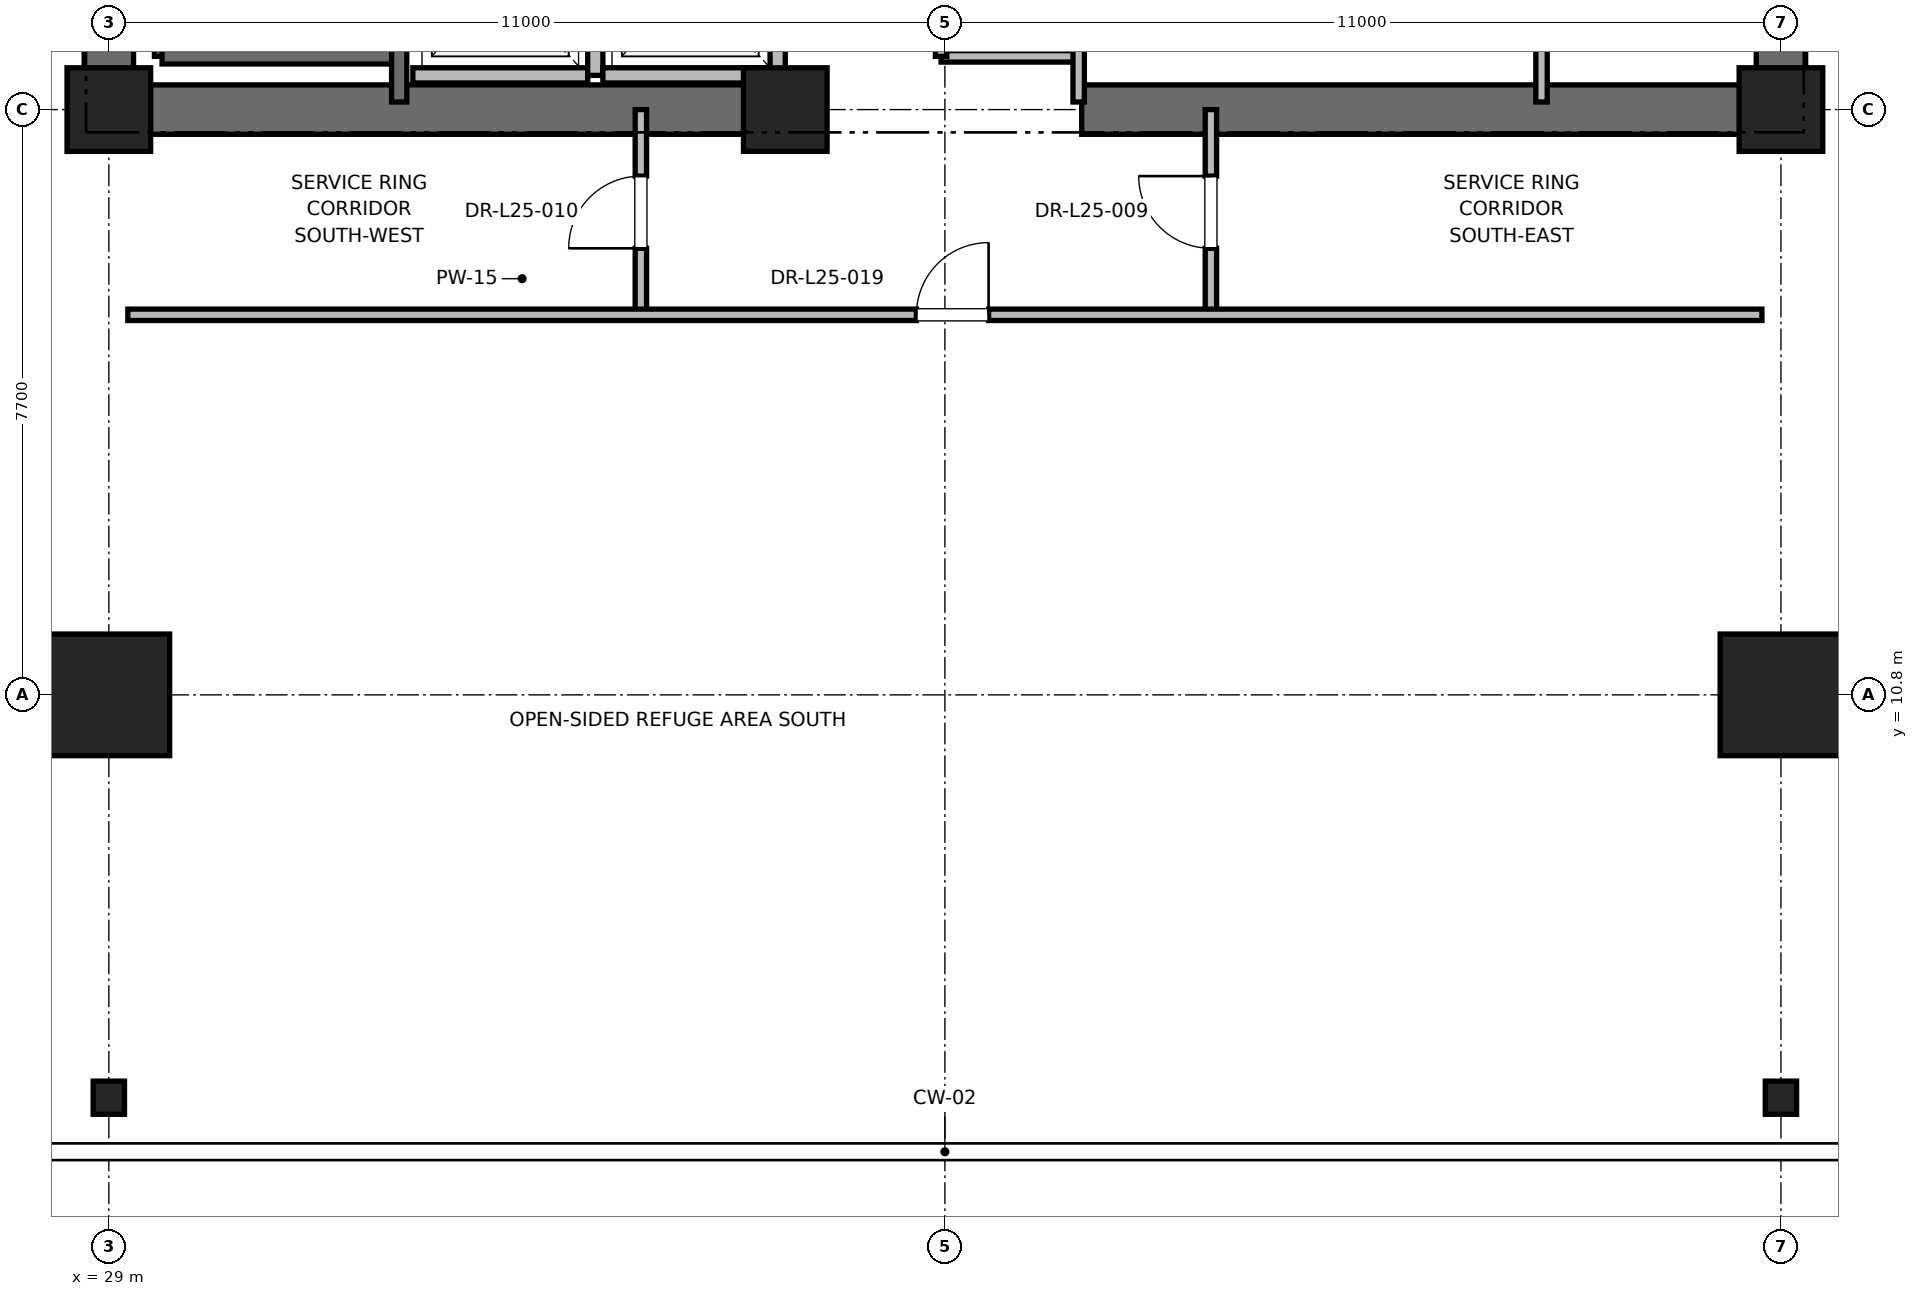
"""IFC4 building model, lengths in metres.
Left out: names, types, materials, properties, quantities, classifications, styles, units other than length and angle.
Written with IfcOpenShell. Run it as: python <this file> out.ifc"""

import sys

from ifc_helpers import new_model, si_unit, direction, frame, frame_2d, origin, origin_2d, place, context, subcontext, project, spatial, rectangle, i_section, extrude, element, fill, save


model = new_model("IFC4")
c1 = context("Model", 3, precision=1e-05, world=origin(), true_north=direction((0.0, 1.0)))
c2 = subcontext(c1, "Body", "Model", "MODEL_VIEW")
j1 = project(units=[si_unit("LENGTHUNIT", "METRE"), si_unit("PLANEANGLEUNIT", "RADIAN")], contexts=[c1])
p1 = place(None, origin())
s1 = spatial("IfcSite", under=j1, at=p1, CompositionType="ELEMENT")
p2 = place(p1, origin())
s2 = spatial("IfcBuilding", under=s1, at=p2, CompositionType="ELEMENT")
p3 = place(p2, frame((0.0, 0.0, 107.6)))
s3 = spatial("IfcBuildingStorey", under=s2, at=p3, CompositionType="ELEMENT", Elevation=107.6)
for number, where, z_axis, x_axis in (
    (1, (29.0, 10.8, 0.0), (0.0, 0.0, 1.0), (1.0, 0.0, 0.0)),
    (2, (51.0, 10.8, 0.0), (0.0, 0.0, 1.0), (1.0, 0.0, 0.0)),
):
    element("IfcColumn", number, at=place(p3, frame(where, z_axis=z_axis, x_axis=x_axis)), inside=s3, PredefinedType="COLUMN", context=c2, shape_type="SweptSolid", body=[
        extrude(rectangle(XDim=1.6, YDim=1.6, at=origin_2d()), origin(), (0.0, 0.0, 1.0), 5.4),
    ])
for number, where, z_axis, x_axis in (
    (3, (29.0, 5.5, 0.0), (0.0, 0.0, 1.0), (1.0, 0.0, 0.0)),
    (4, (51.0, 5.5, 0.0), (0.0, 0.0, 1.0), (1.0, 0.0, 0.0)),
):
    element("IfcColumn", number, at=place(p3, frame(where, z_axis=z_axis, x_axis=x_axis)), inside=s3, PredefinedType="COLUMN", context=c2, shape_type="SweptSolid", body=[
        extrude(i_section(OverallWidth=0.412, OverallDepth=0.437, WebThickness=0.036, FlangeThickness=0.058, FilletRadius=0.015, at=origin_2d()), origin(), (0.0, 0.0, 1.0), 5.4),
    ])
for number, where, z_axis, x_axis in (
    (5, (29.0, 18.5, 0.0), (0.0, 0.0, 1.0), (1.0, 0.0, 0.0)),
    (6, (51.0, 18.5, 0.0), (0.0, 0.0, 1.0), (1.0, 0.0, 0.0)),
    (7, (37.9, 18.5, 0.0), (0.0, 0.0, 1.0), (1.0, 0.0, 0.0)),
):
    element("IfcColumn", number, at=place(p3, frame(where, z_axis=z_axis, x_axis=x_axis)), inside=s3, PredefinedType="PILASTER", context=c2, shape_type="SweptSolid", body=[
        extrude(rectangle(XDim=1.1, YDim=1.1, at=origin_2d()), origin(), (0.0, 0.0, 1.0), 5.4),
    ])
for number, where, z_axis, x_axis in (
    (8, (29.0, 18.5, 0.0), (0.0, 0.0, 1.0), (1.0, 0.0, 0.0)),
    (9, (41.8, 18.5, 0.0), (0.0, 0.0, 1.0), (1.0, 0.0, 0.0)),
):
    element("IfcWall", number, at=place(p3, frame(where, z_axis=z_axis, x_axis=x_axis)), inside=s3, PredefinedType="SHEAR", context=c2, shape_type="SweptSolid", body=[
        extrude(rectangle(XDim=9.2, YDim=0.65, at=frame_2d((4.6, 0.0))), origin(), (0.0, 0.0, 1.0), 5.1),
    ])
p4 = place(p3, frame((29.0, 18.5, 0.0), z_axis=(0.0, 0.0, 1.0), x_axis=(0.0, 1.0, 0.0)))
e10 = element("IfcWall", 10, at=p4, inside=s3, PredefinedType="SHEAR", context=c2, shape_type="SweptSolid", body=[
    extrude(rectangle(XDim=8.8, YDim=0.65, at=frame_2d((4.4, 0.0))), origin(), (0.0, 0.0, 1.0), 5.1),
])
p5 = place(p3, frame((51.0, 18.5, 0.0), z_axis=(0.0, 0.0, 1.0), x_axis=(0.0, 1.0, 0.0)))
e11 = element("IfcWall", 11, at=p5, inside=s3, PredefinedType="SHEAR", context=c2, shape_type="SweptSolid", body=[
    extrude(rectangle(XDim=5.8, YDim=0.65, at=frame_2d((2.9, 0.0))), origin(), (0.0, 0.0, 1.0), 5.1),
])
p6 = place(p3, frame((29.7, 19.2, 0.0), z_axis=(0.0, 0.0, 1.0), x_axis=(0.0, 1.0, 0.0)))
e12 = element("IfcWall", 12, at=p6, inside=s3, PredefinedType="SOLIDWALL", context=c2, shape_type="SweptSolid", body=[
    extrude(rectangle(XDim=8.15, YDim=0.2, at=frame_2d((4.075, 0.0))), origin(), (0.0, 0.0, 1.0), 5.1),
])
p7 = place(p3, frame((29.7, 19.2, 0.0), z_axis=(0.0, 0.0, 1.0), x_axis=(1.0, 0.0, 0.0)))
e13 = element("IfcWall", 13, at=p7, inside=s3, PredefinedType="SOLIDWALL", context=c2, shape_type="SweptSolid", body=[
    extrude(rectangle(XDim=3.12, YDim=0.2, at=frame_2d((1.56, 0.0))), origin(), (0.0, 0.0, 1.0), 5.1),
])
p8 = place(p3, frame((32.82, 18.6, 0.0), z_axis=(0.0, 0.0, 1.0), x_axis=(0.0, 1.0, 0.0)))
e14 = element("IfcWall", 14, at=p8, inside=s3, PredefinedType="SOLIDWALL", context=c2, shape_type="SweptSolid", body=[
    extrude(rectangle(XDim=8.78, YDim=0.2, at=frame_2d((4.39, 0.0))), origin(), (0.0, 0.0, 1.0), 5.1),
])
p9 = place(p3, frame((33.0, 18.95, 0.0), z_axis=(0.0, 0.0, 1.0), x_axis=(1.0, 0.0, 0.0)))
e15 = element("IfcWall", 15, at=p9, inside=s3, PredefinedType="SOLIDWALL", context=c2, shape_type="SweptSolid", body=[
    extrude(rectangle(XDim=2.3, YDim=0.2, at=frame_2d((1.15, 0.0))), origin(), (0.0, 0.0, 1.0), 5.1),
])
p10 = place(p3, frame((35.4, 18.95, 0.0), z_axis=(0.0, 0.0, 1.0), x_axis=(0.0, 1.0, 0.0)))
e16 = element("IfcWall", 16, at=p10, inside=s3, PredefinedType="SOLIDWALL", context=c2, shape_type="SweptSolid", body=[
    extrude(rectangle(XDim=2.6, YDim=0.2, at=frame_2d((1.3, 0.0))), origin(), (0.0, 0.0, 1.0), 5.1),
])
p11 = place(p3, frame((35.5, 18.95, 0.0), z_axis=(0.0, 0.0, 1.0), x_axis=(1.0, 0.0, 0.0)))
e17 = element("IfcWall", 17, at=p11, inside=s3, PredefinedType="SOLIDWALL", context=c2, shape_type="SweptSolid", body=[
    extrude(rectangle(XDim=2.3, YDim=0.2, at=frame_2d((1.15, 0.0))), origin(), (0.0, 0.0, 1.0), 3.88),
])
p12 = place(p3, frame((37.8, 18.95, 0.0), z_axis=(0.0, 0.0, 1.0), x_axis=(0.0, 1.0, 0.0)))
e18 = element("IfcWall", 18, at=p12, inside=s3, PredefinedType="SOLIDWALL", context=c2, shape_type="SweptSolid", body=[
    extrude(rectangle(XDim=2.6, YDim=0.2, at=frame_2d((1.3, 0.0))), origin(), (0.0, 0.0, 1.0), 3.88),
])
p13 = place(p3, frame((39.95, 19.2, 0.0), z_axis=(0.0, 0.0, 1.0), x_axis=(1.0, 0.0, 0.0)))
e19 = element("IfcWall", 19, at=p13, inside=s3, PredefinedType="PARTITIONING", context=c2, shape_type="SweptSolid", body=[
    extrude(rectangle(XDim=1.81, YDim=0.15, at=frame_2d((0.905, 0.0))), origin(), (0.0, 0.0, 1.0), 2.85),
])
p14 = place(p3, frame((41.76, 18.6, 0.0), z_axis=(0.0, 0.0, 1.0), x_axis=(0.0, 1.0, 0.0)))
e20 = element("IfcWall", 20, at=p14, inside=s3, PredefinedType="PARTITIONING", context=c2, shape_type="SweptSolid", body=[
    extrude(rectangle(XDim=3.6, YDim=0.15, at=frame_2d((1.8, 0.0))), origin(), (0.0, 0.0, 1.0), 2.85),
])
p15 = place(p3, frame((39.95, 19.2, 0.0), z_axis=(0.0, 0.0, 1.0), x_axis=(0.0, 1.0, 0.0)))
e21 = element("IfcWall", 21, at=p15, inside=s3, PredefinedType="PARTITIONING", context=c2, shape_type="SweptSolid", body=[
    extrude(rectangle(XDim=3.0, YDim=0.15, at=frame_2d((1.5, 0.0))), origin(), (0.0, 0.0, 1.0), 2.85),
])
p16 = place(p15, frame((1.05, 0.0, 0.0)))
e22 = element("IfcOpeningElement", 22, at=p16, cuts=e21, PredefinedType="OPENING", context=c2, shape_type="SweptSolid", body=[
    extrude(rectangle(XDim=0.9, YDim=2.1, at=frame_2d((0.45, 1.05))), frame((0.0, 0.075, 0.0), z_axis=(0.0, -1.0, 0.0), x_axis=(1.0, 0.0, 0.0)), (0.0, 0.0, 1.0), 0.15),
])
p17 = place(p3, frame((47.85, 18.6, 0.0), z_axis=(0.0, 0.0, 1.0), x_axis=(0.0, 1.0, 0.0)))
e23 = element("IfcWall", 23, at=p17, inside=s3, PredefinedType="PARTITIONING", context=c2, shape_type="SweptSolid", body=[
    extrude(rectangle(XDim=2.54, YDim=0.15, at=frame_2d((1.27, 0.0))), origin(), (0.0, 0.0, 1.0), 2.85),
])
p18 = place(p3, frame((36.0, 15.8, 0.0), z_axis=(0.0, 0.0, 1.0), x_axis=(0.0, 1.0, 0.0)))
e24 = element("IfcWall", 24, at=p18, inside=s3, PredefinedType="PARTITIONING", context=c2, shape_type="SweptSolid", body=[
    extrude(rectangle(XDim=2.7, YDim=0.15, at=frame_2d((1.35, 0.0))), origin(), (0.0, 0.0, 1.0), 2.85),
])
p19 = place(p18, frame((0.875, 0.0, 0.0)))
e25 = element("IfcOpeningElement", 25, at=p19, cuts=e24, PredefinedType="OPENING", context=c2, shape_type="SweptSolid", body=[
    extrude(rectangle(XDim=0.95, YDim=2.15, at=frame_2d((0.475, 1.075))), frame((0.0, 0.075, 0.0), z_axis=(0.0, -1.0, 0.0), x_axis=(1.0, 0.0, 0.0)), (0.0, 0.0, 1.0), 0.15),
])
p20 = place(p3, frame((43.5, 15.8, 0.0), z_axis=(0.0, 0.0, 1.0), x_axis=(0.0, 1.0, 0.0)))
e26 = element("IfcWall", 26, at=p20, inside=s3, PredefinedType="PARTITIONING", context=c2, shape_type="SweptSolid", body=[
    extrude(rectangle(XDim=2.7, YDim=0.15, at=frame_2d((1.35, 0.0))), origin(), (0.0, 0.0, 1.0), 2.85),
])
p21 = place(p20, frame((0.875, 0.0, 0.0)))
e27 = element("IfcOpeningElement", 27, at=p21, cuts=e26, PredefinedType="OPENING", context=c2, shape_type="SweptSolid", body=[
    extrude(rectangle(XDim=0.95, YDim=2.15, at=frame_2d((0.475, 1.075))), frame((0.0, 0.075, 0.0), z_axis=(0.0, -1.0, 0.0), x_axis=(1.0, 0.0, 0.0)), (0.0, 0.0, 1.0), 0.15),
])
p22 = place(p3, frame((29.25, 15.8, 0.0), z_axis=(0.0, 0.0, 1.0), x_axis=(1.0, 0.0, 0.0)))
e28 = element("IfcWall", 28, at=p22, inside=s3, PredefinedType="PARTITIONING", context=c2, shape_type="SweptSolid", body=[
    extrude(rectangle(XDim=21.5, YDim=0.15, at=frame_2d((10.75, 0.0))), origin(), (0.0, 0.0, 1.0), 2.85),
])
p23 = place(p22, frame((10.375, 0.0, 0.0)))
e29 = element("IfcOpeningElement", 29, at=p23, cuts=e28, PredefinedType="OPENING", context=c2, shape_type="SweptSolid", body=[
    extrude(rectangle(XDim=0.95, YDim=2.15, at=frame_2d((0.475, 1.075))), frame((0.0, 0.075, 0.0), z_axis=(0.0, -1.0, 0.0), x_axis=(1.0, 0.0, 0.0)), (0.0, 0.0, 1.0), 0.15),
])
p24 = place(p19, origin())
e30 = element("IfcDoor", 30, at=p24, inside=s3, OperationType="SINGLE_SWING_LEFT", PredefinedType="DOOR", context=c2, shape_type="SweptSolid", body=[
    extrude(rectangle(XDim=0.95, YDim=2.15, at=frame_2d((0.475, 1.075))), frame((0.0, 0.025, 0.0), z_axis=(0.0, -1.0, 0.0), x_axis=(1.0, 0.0, 0.0)), (0.0, 0.0, 1.0), 0.05),
])
fill(e25, e30)
p25 = place(p21, origin())
e31 = element("IfcDoor", 31, at=p25, inside=s3, OperationType="SINGLE_SWING_RIGHT", PredefinedType="DOOR", context=c2, shape_type="SweptSolid", body=[
    extrude(rectangle(XDim=0.95, YDim=2.15, at=frame_2d((0.475, 1.075))), frame((0.0, 0.025, 0.0), z_axis=(0.0, -1.0, 0.0), x_axis=(1.0, 0.0, 0.0)), (0.0, 0.0, 1.0), 0.05),
])
fill(e27, e31)
p26 = place(p23, origin())
e32 = element("IfcDoor", 32, at=p26, inside=s3, OperationType="SINGLE_SWING_RIGHT", PredefinedType="DOOR", context=c2, shape_type="SweptSolid", body=[
    extrude(rectangle(XDim=0.95, YDim=2.15, at=frame_2d((0.475, 1.075))), frame((0.0, 0.025, 0.0), z_axis=(0.0, -1.0, 0.0), x_axis=(1.0, 0.0, 0.0)), (0.0, 0.0, 1.0), 0.05),
])
fill(e29, e32)
save(model, sys.argv[1])
